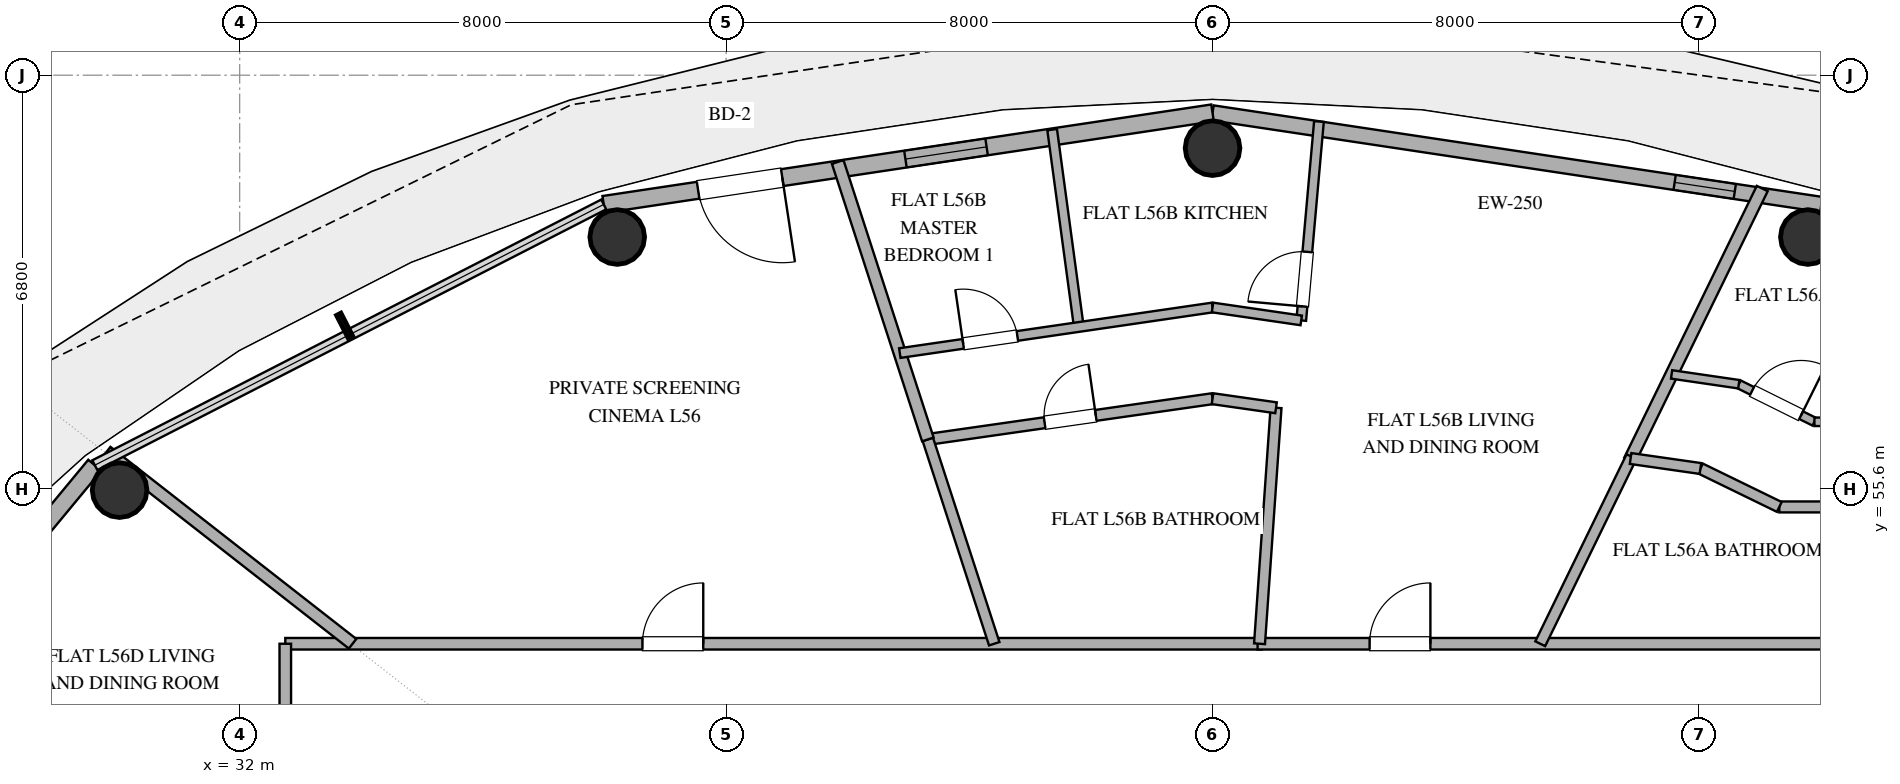
"""IFC4 building model, lengths in metres.
Left out: names, types, materials, properties, quantities, classifications, styles, units other than length and angle.
Written with IfcOpenShell. Run it as: python <this file> out.ifc"""

import sys

from ifc_helpers import new_model, si_unit, direction, frame, frame_2d, origin, origin_2d, place, context, subcontext, project, spatial, rectangle, hollow_circle, extrude, element, fill, save


model = new_model("IFC4")
c1 = context("Model", 3, precision=1e-05, world=origin(), true_north=direction((0.0, 1.0)))
c2 = subcontext(c1, "Body", "Model", "MODEL_VIEW")
j1 = project(units=[si_unit("LENGTHUNIT", "METRE"), si_unit("PLANEANGLEUNIT", "RADIAN")], contexts=[c1])
p1 = place(None, origin())
s1 = spatial("IfcSite", under=j1, at=p1, CompositionType="ELEMENT")
p2 = place(p1, origin())
s2 = spatial("IfcBuilding", under=s1, at=p2, CompositionType="ELEMENT")
p3 = place(p2, frame((0.0, 0.0, 220.8)))
s3 = spatial("IfcBuildingStorey", under=s2, at=p3, CompositionType="ELEMENT", Elevation=220.8)
for number, where, z_axis, x_axis in (
    (1, (57.791, 59.739, 0.0), (0.0, 0.0, 1.0), (1.0, 0.0, 0.0)),
    (2, (48.0, 61.2, 0.0), (0.0, 0.0, 1.0), (1.0, 0.0, 0.0)),
    (3, (38.209, 59.739, 0.0), (0.0, 0.0, 1.0), (1.0, 0.0, 0.0)),
    (4, (30.025, 55.576, 0.0), (0.0, 0.0, 1.0), (1.0, 0.0, 0.0)),
):
    element("IfcColumn", number, at=place(p3, frame(where, z_axis=z_axis, x_axis=x_axis)), inside=s3, PredefinedType="COLUMN", context=c2, shape_type="SweptSolid", body=[
        extrude(hollow_circle(Radius=0.45, WallThickness=0.025, at=origin_2d()), origin(), (0.0, 0.0, 1.0), 3.36),
    ])
p4 = place(p3, frame((66.383, 55.987, 0.0), z_axis=(0.0, 0.0, 1.0), x_axis=(-0.890007394051, 0.455946091699, 0.0)))
e5 = element("IfcWall", 5, at=p4, inside=s3, PredefinedType="SOLIDWALL", context=c2, shape_type="SweptSolid", body=[
    extrude(rectangle(XDim=9.404, YDim=0.28, at=frame_2d((4.702, 0.0))), origin(), (0.0, 0.0, 1.0), 3.36),
])
p5 = place(p4, frame((1.661, 0.0, 0.85)))
e6 = element("IfcOpeningElement", 6, at=p5, cuts=e5, PredefinedType="OPENING", context=c2, shape_type="SweptSolid", body=[
    extrude(rectangle(XDim=1.0, YDim=1.8, at=frame_2d((0.5, 0.9))), frame((0.0, 0.15, 0.0), z_axis=(0.0, -1.0, 0.0), x_axis=(1.0, 0.0, 0.0)), (0.0, 0.0, 1.0), 0.3),
])
p6 = place(p4, frame((3.823, 0.0, 0.85)))
e7 = element("IfcOpeningElement", 7, at=p6, cuts=e5, PredefinedType="OPENING", context=c2, shape_type="SweptSolid", body=[
    extrude(rectangle(XDim=1.5, YDim=1.8, at=frame_2d((0.75, 0.9))), frame((0.0, 0.15, 0.0), z_axis=(0.0, -1.0, 0.0), x_axis=(1.0, 0.0, 0.0)), (0.0, 0.0, 1.0), 0.3),
])
p7 = place(p4, frame((6.503, 0.0, 0.85)))
e8 = element("IfcOpeningElement", 8, at=p7, cuts=e5, PredefinedType="OPENING", context=c2, shape_type="SweptSolid", body=[
    extrude(rectangle(XDim=1.35, YDim=1.8, at=frame_2d((0.675, 0.9))), frame((0.0, 0.15, 0.0), z_axis=(0.0, -1.0, 0.0), x_axis=(1.0, 0.0, 0.0)), (0.0, 0.0, 1.0), 0.3),
])
p8 = place(p3, frame((58.013, 60.274, 0.0), z_axis=(0.0, 0.0, 1.0), x_axis=(-0.988882522213, 0.148698881169, 0.0)))
e9 = element("IfcWall", 9, at=p8, inside=s3, PredefinedType="SOLIDWALL", context=c2, shape_type="SweptSolid", body=[
    extrude(rectangle(XDim=10.125, YDim=0.25, at=frame_2d((5.062, 0.0))), origin(), (0.0, 0.0, 1.0), 3.36),
])
p9 = place(p8, frame((1.44, 0.0, 1.42)))
e10 = element("IfcOpeningElement", 10, at=p9, cuts=e9, PredefinedType="OPENING", context=c2, shape_type="SweptSolid", body=[
    extrude(rectangle(XDim=1.0, YDim=1.05, at=frame_2d((0.5, 0.525))), frame((0.0, 0.135, 0.0), z_axis=(0.0, -1.0, 0.0), x_axis=(1.0, 0.0, 0.0)), (0.0, 0.0, 1.0), 0.27),
])
p10 = place(p3, frame((48.0, 61.78, 0.0), z_axis=(0.0, 0.0, 1.0), x_axis=(-0.988882522213, -0.148698881169, 0.0)))
e11 = element("IfcWall", 11, at=p10, inside=s3, PredefinedType="SOLIDWALL", context=c2, shape_type="SweptSolid", body=[
    extrude(rectangle(XDim=10.125, YDim=0.28, at=frame_2d((5.062, 0.0))), origin(), (0.0, 0.0, 1.0), 3.36),
])
p11 = place(p10, frame((3.758, 0.0, 0.85)))
e12 = element("IfcOpeningElement", 12, at=p11, cuts=e11, PredefinedType="OPENING", context=c2, shape_type="SweptSolid", body=[
    extrude(rectangle(XDim=1.35, YDim=1.8, at=frame_2d((0.675, 0.9))), frame((0.0, 0.15, 0.0), z_axis=(0.0, -1.0, 0.0), x_axis=(1.0, 0.0, 0.0)), (0.0, 0.0, 1.0), 0.3),
])
p12 = place(p10, frame((7.156, 0.0, 0.0)))
e13 = element("IfcOpeningElement", 13, at=p12, cuts=e11, PredefinedType="OPENING", context=c2, shape_type="SweptSolid", body=[
    extrude(rectangle(XDim=1.4, YDim=2.2, at=frame_2d((0.7, 1.1))), frame((0.0, 0.15, 0.0), z_axis=(0.0, -1.0, 0.0), x_axis=(1.0, 0.0, 0.0)), (0.0, 0.0, 1.0), 0.3),
])
p13 = place(p3, frame((29.617, 55.987, 0.0), z_axis=(0.0, 0.0, 1.0), x_axis=(-0.63761509934, -0.770355103243, 0.0)))
e14 = element("IfcWall", 14, at=p13, inside=s3, PredefinedType="SOLIDWALL", context=c2, shape_type="SweptSolid", body=[
    extrude(rectangle(XDim=8.33, YDim=0.28, at=frame_2d((4.165, 0.0))), origin(), (0.0, 0.0, 1.0), 3.36),
])
p14 = place(p13, frame((2.074, 0.0, 0.85)))
e15 = element("IfcOpeningElement", 15, at=p14, cuts=e14, PredefinedType="OPENING", context=c2, shape_type="SweptSolid", body=[
    extrude(rectangle(XDim=1.2, YDim=1.6, at=frame_2d((0.6, 0.8))), frame((0.0, 0.15, 0.0), z_axis=(0.0, -1.0, 0.0), x_axis=(1.0, 0.0, 0.0)), (0.0, 0.0, 1.0), 0.3),
])
p15 = place(p13, frame((3.892, 0.0, 0.85)))
e16 = element("IfcOpeningElement", 16, at=p15, cuts=e14, PredefinedType="OPENING", context=c2, shape_type="SweptSolid", body=[
    extrude(rectangle(XDim=1.2, YDim=1.6, at=frame_2d((0.6, 0.8))), frame((0.0, 0.15, 0.0), z_axis=(0.0, -1.0, 0.0), x_axis=(1.0, 0.0, 0.0)), (0.0, 0.0, 1.0), 0.3),
])
p16 = place(p3, frame((32.75, 53.05, 0.0), z_axis=(0.0, 0.0, 1.0), x_axis=(1.0, 0.0, 0.0)))
e17 = element("IfcWall", 17, at=p16, inside=s3, PredefinedType="PARTITIONING", context=c2, shape_type="SweptSolid", body=[
    extrude(rectangle(XDim=16.055, YDim=0.19, at=frame_2d((8.027, 0.0))), origin(), (0.0, 0.0, 1.0), 2.72),
])
p17 = place(p16, frame((5.874, 0.0, 0.0)))
e18 = element("IfcOpeningElement", 18, at=p17, cuts=e17, PredefinedType="OPENING", context=c2, shape_type="SweptSolid", body=[
    extrude(rectangle(XDim=1.0, YDim=2.2, at=frame_2d((0.5, 1.1))), frame((0.0, 0.105, 0.0), z_axis=(0.0, -1.0, 0.0), x_axis=(1.0, 0.0, 0.0)), (0.0, 0.0, 1.0), 0.21),
])
p18 = place(p3, frame((48.74, 53.05, 0.0), z_axis=(0.0, 0.0, 1.0), x_axis=(1.0, 0.0, 0.0)))
e19 = element("IfcWall", 19, at=p18, inside=s3, PredefinedType="PARTITIONING", context=c2, shape_type="SweptSolid", body=[
    extrude(rectangle(XDim=14.51, YDim=0.19, at=frame_2d((7.255, 0.0))), origin(), (0.0, 0.0, 1.0), 2.72),
])
p19 = place(p18, frame((1.842, 0.0, 0.0)))
e20 = element("IfcOpeningElement", 20, at=p19, cuts=e19, PredefinedType="OPENING", context=c2, shape_type="SweptSolid", body=[
    extrude(rectangle(XDim=1.0, YDim=2.2, at=frame_2d((0.5, 1.1))), frame((0.0, 0.105, 0.0), z_axis=(0.0, -1.0, 0.0), x_axis=(1.0, 0.0, 0.0)), (0.0, 0.0, 1.0), 0.21),
])
p20 = place(p3, frame((32.75, 43.356, 0.0), z_axis=(0.0, 0.0, 1.0), x_axis=(0.0, 1.0, 0.0)))
e21 = element("IfcWall", 21, at=p20, inside=s3, PredefinedType="PARTITIONING", context=c2, shape_type="SweptSolid", body=[
    extrude(rectangle(XDim=9.694, YDim=0.19, at=frame_2d((4.847, 0.0))), origin(), (0.0, 0.0, 1.0), 2.72),
])
p21 = place(p20, frame((5.983, 0.0, 0.0)))
e22 = element("IfcOpeningElement", 22, at=p21, cuts=e21, PredefinedType="OPENING", context=c2, shape_type="SweptSolid", body=[
    extrude(rectangle(XDim=1.0, YDim=2.2, at=frame_2d((0.5, 1.1))), frame((0.0, 0.105, 0.0), z_axis=(0.0, -1.0, 0.0), x_axis=(1.0, 0.0, 0.0)), (0.0, 0.0, 1.0), 0.21),
])
p22 = place(p3, frame((29.813, 56.209, 0.0), z_axis=(0.0, 0.0, 1.0), x_axis=(0.788043849094, -0.615619112687, 0.0)))
e23 = element("IfcWall", 23, at=p22, inside=s3, PredefinedType="PARTITIONING", context=c2, shape_type="SweptSolid", body=[
    extrude(rectangle(XDim=5.131, YDim=0.2, at=frame_2d((2.566, 0.0))), origin(), (0.0, 0.0, 1.0), 2.72),
])
p23 = place(p3, frame((43.318, 56.41, 0.0), z_axis=(0.0, 0.0, 1.0), x_axis=(0.989918499483, 0.141638145927, 0.0)))
e24 = element("IfcWall", 24, at=p23, inside=s3, PredefinedType="PLUMBINGWALL", context=c2, shape_type="SweptSolid", body=[
    extrude(rectangle(XDim=4.73, YDim=0.18, at=frame_2d((2.365, 0.0))), origin(), (0.0, 0.0, 1.0), 2.72),
])
p24 = place(p23, frame((1.94, 0.0, 0.0)))
e25 = element("IfcOpeningElement", 25, at=p24, cuts=e24, PredefinedType="OPENING", context=c2, shape_type="SweptSolid", body=[
    extrude(rectangle(XDim=0.85, YDim=2.1, at=frame_2d((0.425, 1.05))), frame((0.0, 0.1, 0.0), z_axis=(0.0, -1.0, 0.0), x_axis=(1.0, 0.0, 0.0)), (0.0, 0.0, 1.0), 0.2),
])
p25 = place(p3, frame((49.044, 56.931, 0.0), z_axis=(0.0, 0.0, 1.0), x_axis=(-0.0697885329, -0.997561807948, 0.0)))
e26 = element("IfcWall", 26, at=p25, inside=s3, PredefinedType="PLUMBINGWALL", context=c2, shape_type="SweptSolid", body=[
    extrude(rectangle(XDim=3.89, YDim=0.18, at=frame_2d((1.945, 0.0))), origin(), (0.0, 0.0, 1.0), 2.72),
])
p26 = place(p3, frame((44.41, 53.05, 0.0), z_axis=(0.0, 0.0, 1.0), x_axis=(-0.309025133622, 0.951053871655, 0.0)))
e27 = element("IfcWall", 27, at=p26, inside=s3, PredefinedType="PLUMBINGWALL", context=c2, shape_type="SweptSolid", body=[
    extrude(rectangle(XDim=3.533, YDim=0.18, at=frame_2d((1.767, 0.0))), origin(), (0.0, 0.0, 1.0), 2.72),
])
p27 = place(p3, frame((57.041, 60.536, 0.0), z_axis=(0.0, 0.0, 1.0), x_axis=(-0.438355931311, -0.898801467224, 0.0)))
e28 = element("IfcWall", 28, at=p27, inside=s3, PredefinedType="PARTITIONING", context=c2, shape_type="SweptSolid", body=[
    extrude(rectangle(XDim=4.974, YDim=0.2, at=frame_2d((2.487, 0.0))), origin(), (0.0, 0.0, 1.0), 2.72),
])
p28 = place(p3, frame((54.89, 56.127, 0.0), z_axis=(0.0, 0.0, 1.0), x_axis=(-0.438347749683, -0.898805457453, 0.0)))
e29 = element("IfcWall", 29, at=p28, inside=s3, PredefinedType="PLUMBINGWALL", context=c2, shape_type="SweptSolid", body=[
    extrude(rectangle(XDim=3.423, YDim=0.18, at=frame_2d((1.711, 0.0))), origin(), (0.0, 0.0, 1.0), 2.72),
])
p29 = place(p3, frame((43.318, 56.41, 0.0), z_axis=(0.0, 0.0, 1.0), x_axis=(-0.309012424199, 0.951058001223, 0.0)))
e30 = element("IfcWall", 30, at=p29, inside=s3, PredefinedType="PARTITIONING", context=c2, shape_type="SweptSolid", body=[
    extrude(rectangle(XDim=4.797, YDim=0.2, at=frame_2d((2.399, 0.0))), origin(), (0.0, 0.0, 1.0), 2.72),
])
p30 = place(p3, frame((49.458, 58.367, 0.0), z_axis=(0.0, 0.0, 1.0), x_axis=(0.088772560689, 0.996051922577, 0.0)))
e31 = element("IfcWall", 31, at=p30, inside=s3, PredefinedType="PLUMBINGWALL", context=c2, shape_type="SweptSolid", body=[
    extrude(rectangle(XDim=3.284, YDim=0.16, at=frame_2d((1.642, 0.0))), origin(), (0.0, 0.0, 1.0), 2.72),
])
p31 = place(p30, frame((0.232, 0.0, 0.0)))
e32 = element("IfcOpeningElement", 32, at=p31, cuts=e31, PredefinedType="OPENING", context=c2, shape_type="SweptSolid", body=[
    extrude(rectangle(XDim=0.9, YDim=2.1, at=frame_2d((0.45, 1.05))), frame((0.0, 0.09, 0.0), z_axis=(0.0, -1.0, 0.0), x_axis=(1.0, 0.0, 0.0)), (0.0, 0.0, 1.0), 0.18),
])
p32 = place(p3, frame((45.801, 58.259, 0.0), z_axis=(0.0, 0.0, 1.0), x_axis=(-0.13403859548, 0.990976112185, 0.0)))
e33 = element("IfcWall", 33, at=p32, inside=s3, PredefinedType="PLUMBINGWALL", context=c2, shape_type="SweptSolid", body=[
    extrude(rectangle(XDim=3.275, YDim=0.16, at=frame_2d((1.637, 0.0))), origin(), (0.0, 0.0, 1.0), 2.72),
])
p33 = place(p3, frame((42.856, 57.83, 0.0), z_axis=(0.0, 0.0, 1.0), x_axis=(0.989542480506, 0.144241739018, 0.0)))
e34 = element("IfcWall", 34, at=p33, inside=s3, PredefinedType="PLUMBINGWALL", context=c2, shape_type="SweptSolid", body=[
    extrude(rectangle(XDim=5.198, YDim=0.16, at=frame_2d((2.599, 0.0))), origin(), (0.0, 0.0, 1.0), 2.72),
])
p34 = place(p33, frame((1.054, 0.0, 0.0)))
e35 = element("IfcOpeningElement", 35, at=p34, cuts=e34, PredefinedType="OPENING", context=c2, shape_type="SweptSolid", body=[
    extrude(rectangle(XDim=0.9, YDim=2.1, at=frame_2d((0.45, 1.05))), frame((0.0, 0.09, 0.0), z_axis=(0.0, -1.0, 0.0), x_axis=(1.0, 0.0, 0.0)), (0.0, 0.0, 1.0), 0.18),
])
p35 = place(p3, frame((57.321, 55.3, 0.0), z_axis=(0.0, 0.0, 1.0), x_axis=(1.0, 0.0, 0.0)))
e36 = element("IfcWall", 36, at=p35, inside=s3, PredefinedType="PLUMBINGWALL", context=c2, shape_type="SweptSolid", body=[
    extrude(rectangle(XDim=1.748, YDim=0.18, at=frame_2d((0.874, 0.0))), origin(), (0.0, 0.0, 1.0), 2.72),
])
p36 = place(p3, frame((48.0, 58.58, 0.0), z_axis=(0.0, 0.0, 1.0), x_axis=(0.989514247961, -0.144435290295, 0.0)))
e37 = element("IfcWall", 37, at=p36, inside=s3, PredefinedType="PLUMBINGWALL", context=c2, shape_type="SweptSolid", body=[
    extrude(rectangle(XDim=1.474, YDim=0.16, at=frame_2d((0.737, 0.0))), origin(), (0.0, 0.0, 1.0), 2.72),
])
p37 = place(p3, frame((56.024, 55.932, 0.0), z_axis=(0.0, 0.0, 1.0), x_axis=(0.898916394035, -0.438120207861, 0.0)))
e38 = element("IfcWall", 38, at=p37, inside=s3, PredefinedType="PLUMBINGWALL", context=c2, shape_type="SweptSolid", body=[
    extrude(rectangle(XDim=1.443, YDim=0.18, at=frame_2d((0.721, 0.0))), origin(), (0.0, 0.0, 1.0), 2.72),
])
p38 = place(p3, frame((56.655, 57.318, 0.0), z_axis=(0.0, 0.0, 1.0), x_axis=(0.895584310315, -0.444891833053, 0.0)))
e39 = element("IfcWall", 39, at=p38, inside=s3, PredefinedType="PARTITIONING", context=c2, shape_type="SweptSolid", body=[
    extrude(rectangle(XDim=1.389, YDim=0.14, at=frame_2d((0.694, 0.0))), origin(), (0.0, 0.0, 1.0), 2.72),
])
p39 = place(p38, frame((0.244, 0.0, 0.0)))
e40 = element("IfcOpeningElement", 40, at=p39, cuts=e39, PredefinedType="OPENING", context=c2, shape_type="SweptSolid", body=[
    extrude(rectangle(XDim=0.9, YDim=2.1, at=frame_2d((0.45, 1.05))), frame((0.0, 0.08, 0.0), z_axis=(0.0, -1.0, 0.0), x_axis=(1.0, 0.0, 0.0)), (0.0, 0.0, 1.0), 0.16),
])
p40 = place(p3, frame((54.875, 56.096, 0.0), z_axis=(0.0, 0.0, 1.0), x_axis=(0.989924230083, -0.141598088596, 0.0)))
e41 = element("IfcWall", 41, at=p40, inside=s3, PredefinedType="PLUMBINGWALL", context=c2, shape_type="SweptSolid", body=[
    extrude(rectangle(XDim=1.16, YDim=0.18, at=frame_2d((0.58, 0.0))), origin(), (0.0, 0.0, 1.0), 2.72),
])
p41 = place(p3, frame((55.55, 57.479, 0.0), z_axis=(0.0, 0.0, 1.0), x_axis=(0.989534281859, -0.144297973051, 0.0)))
e42 = element("IfcWall", 42, at=p41, inside=s3, PredefinedType="PARTITIONING", context=c2, shape_type="SweptSolid", body=[
    extrude(rectangle(XDim=1.117, YDim=0.14, at=frame_2d((0.558, 0.0))), origin(), (0.0, 0.0, 1.0), 2.72),
])
p42 = place(p3, frame((57.899, 56.7, 0.0), z_axis=(0.0, 0.0, 1.0), x_axis=(1.0, 0.0, 0.0)))
e43 = element("IfcWall", 43, at=p42, inside=s3, PredefinedType="PARTITIONING", context=c2, shape_type="SweptSolid", body=[
    extrude(rectangle(XDim=1.065, YDim=0.14, at=frame_2d((0.533, 0.0))), origin(), (0.0, 0.0, 1.0), 2.72),
])
p43 = place(p3, frame((48.0, 57.08, 0.0), z_axis=(0.0, 0.0, 1.0), x_axis=(0.989917064499, -0.141648174766, 0.0)))
e44 = element("IfcWall", 44, at=p43, inside=s3, PredefinedType="PLUMBINGWALL", context=c2, shape_type="SweptSolid", body=[
    extrude(rectangle(XDim=1.055, YDim=0.18, at=frame_2d((0.527, 0.0))), origin(), (0.0, 0.0, 1.0), 2.72),
])
p44 = place(p11, origin())
e45 = element("IfcWindow", 45, at=p44, inside=s3, PartitioningType="SINGLE_PANEL", PredefinedType="WINDOW", context=c2, shape_type="SweptSolid", body=[
    extrude(rectangle(XDim=1.35, YDim=1.8, at=frame_2d((0.675, 0.9))), frame((0.0, 0.03, 0.0), z_axis=(0.0, -1.0, 0.0), x_axis=(1.0, 0.0, 0.0)), (0.0, 0.0, 1.0), 0.06),
])
fill(e12, e45)
p45 = place(p12, origin())
e46 = element("IfcDoor", 46, at=p45, inside=s3, OperationType="SINGLE_SWING_LEFT", PredefinedType="DOOR", context=c2, shape_type="SweptSolid", body=[
    extrude(rectangle(XDim=1.4, YDim=2.2, at=frame_2d((0.7, 1.1))), frame((0.0, 0.025, 0.0), z_axis=(0.0, -1.0, 0.0), x_axis=(1.0, 0.0, 0.0)), (0.0, 0.0, 1.0), 0.05),
])
fill(e13, e46)
p46 = place(p9, origin())
e47 = element("IfcWindow", 47, at=p46, inside=s3, PartitioningType="SINGLE_PANEL", PredefinedType="WINDOW", context=c2, shape_type="SweptSolid", body=[
    extrude(rectangle(XDim=1.0, YDim=1.05, at=frame_2d((0.5, 0.525))), frame((0.0, 0.03, 0.0), z_axis=(0.0, -1.0, 0.0), x_axis=(1.0, 0.0, 0.0)), (0.0, 0.0, 1.0), 0.06),
])
fill(e10, e47)
p47 = place(p17, origin())
e48 = element("IfcDoor", 48, at=p47, inside=s3, OperationType="SINGLE_SWING_RIGHT", PredefinedType="DOOR", context=c2, shape_type="SweptSolid", body=[
    extrude(rectangle(XDim=1.0, YDim=2.2, at=frame_2d((0.5, 1.1))), frame((0.0, 0.025, 0.0), z_axis=(0.0, -1.0, 0.0), x_axis=(1.0, 0.0, 0.0)), (0.0, 0.0, 1.0), 0.05),
])
fill(e18, e48)
p48 = place(p19, origin())
e49 = element("IfcDoor", 49, at=p48, inside=s3, OperationType="SINGLE_SWING_RIGHT", PredefinedType="DOOR", context=c2, shape_type="SweptSolid", body=[
    extrude(rectangle(XDim=1.0, YDim=2.2, at=frame_2d((0.5, 1.1))), frame((0.0, 0.025, 0.0), z_axis=(0.0, -1.0, 0.0), x_axis=(1.0, 0.0, 0.0)), (0.0, 0.0, 1.0), 0.05),
])
fill(e20, e49)
p49 = place(p24, origin())
e50 = element("IfcDoor", 50, at=p49, inside=s3, OperationType="SINGLE_SWING_RIGHT", PredefinedType="DOOR", context=c2, shape_type="SweptSolid", body=[
    extrude(rectangle(XDim=0.85, YDim=2.1, at=frame_2d((0.425, 1.05))), frame((0.0, 0.025, 0.0), z_axis=(0.0, -1.0, 0.0), x_axis=(1.0, 0.0, 0.0)), (0.0, 0.0, 1.0), 0.05),
])
fill(e25, e50)
p50 = place(p31, origin())
e51 = element("IfcDoor", 51, at=p50, inside=s3, OperationType="SINGLE_SWING_LEFT", PredefinedType="DOOR", context=c2, shape_type="SweptSolid", body=[
    extrude(rectangle(XDim=0.9, YDim=2.1, at=frame_2d((0.45, 1.05))), frame((0.0, 0.025, 0.0), z_axis=(0.0, -1.0, 0.0), x_axis=(1.0, 0.0, 0.0)), (0.0, 0.0, 1.0), 0.05),
])
fill(e32, e51)
p51 = place(p34, origin())
e52 = element("IfcDoor", 52, at=p51, inside=s3, OperationType="SINGLE_SWING_LEFT", PredefinedType="DOOR", context=c2, shape_type="SweptSolid", body=[
    extrude(rectangle(XDim=0.9, YDim=2.1, at=frame_2d((0.45, 1.05))), frame((0.0, 0.025, 0.0), z_axis=(0.0, -1.0, 0.0), x_axis=(1.0, 0.0, 0.0)), (0.0, 0.0, 1.0), 0.05),
])
fill(e35, e52)
p52 = place(p39, origin())
e53 = element("IfcDoor", 53, at=p52, inside=s3, OperationType="SINGLE_SWING_RIGHT", PredefinedType="DOOR", context=c2, shape_type="SweptSolid", body=[
    extrude(rectangle(XDim=0.9, YDim=2.1, at=frame_2d((0.45, 1.05))), frame((0.0, 0.025, 0.0), z_axis=(0.0, -1.0, 0.0), x_axis=(1.0, 0.0, 0.0)), (0.0, 0.0, 1.0), 0.05),
])
fill(e40, e53)
save(model, sys.argv[1])
